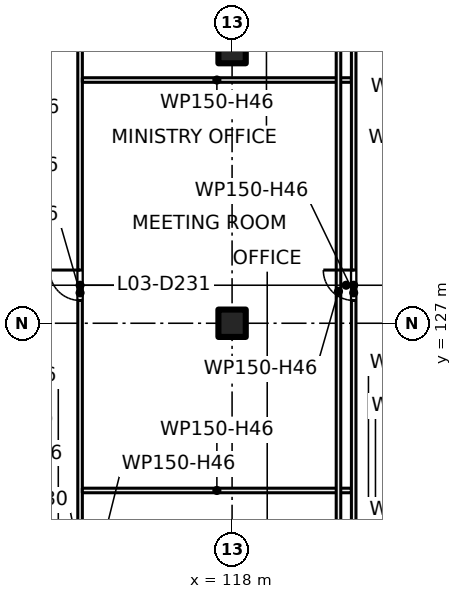
"""IFC4 building model, lengths in metres.
Left out: names, types, materials, properties, quantities, classifications, styles, units other than length and angle.
Written with IfcOpenShell. Run it as: python <this file> out.ifc"""

import sys

from ifc_helpers import new_model, si_unit, direction, frame, frame_2d, origin, origin_2d, place, context, subcontext, project, spatial, rectangle, extrude, element, fill, save


model = new_model("IFC4")
c1 = context("Model", 3, precision=1e-05, world=origin(), true_north=direction((0.0, 1.0)))
c2 = subcontext(c1, "Body", "Model", "MODEL_VIEW")
j1 = project(units=[si_unit("LENGTHUNIT", "METRE"), si_unit("PLANEANGLEUNIT", "RADIAN")], contexts=[c1])
p1 = place(None, origin())
s1 = spatial("IfcSite", under=j1, at=p1, CompositionType="ELEMENT")
p2 = place(p1, origin())
s2 = spatial("IfcBuilding", under=s1, at=p2, CompositionType="ELEMENT")
p3 = place(p2, frame((0.0, 0.0, 17.5)))
s3 = spatial("IfcBuildingStorey", under=s2, at=p3, CompositionType="ELEMENT", Elevation=17.5)
for number, where, z_axis, x_axis in (
    (1, (118.0, 127.0, 0.0), (0.0, 0.0, 1.0), (1.0, 0.0, 0.0)),
    (2, (118.0, 136.0, 0.0), (0.0, 0.0, 1.0), (1.0, 0.0, 0.0)),
):
    element("IfcColumn", number, at=place(p3, frame(where, z_axis=z_axis, x_axis=x_axis)), inside=s3, PredefinedType="COLUMN", context=c2, shape_type="SweptSolid", body=[
        extrude(rectangle(XDim=0.9, YDim=0.9, at=origin_2d()), origin(), (0.0, 0.0, 1.0), 5.0),
    ])
p4 = place(p3, frame((113.0, 139.002, 0.0), z_axis=(0.0, 0.0, 1.0), x_axis=(0.0, -1.0, 0.0)))
e3 = element("IfcWall", 3, at=p4, inside=s3, PredefinedType="PARTITIONING", context=c2, shape_type="SweptSolid", body=[
    extrude(rectangle(XDim=22.004, YDim=0.15, at=frame_2d((11.002, 0.0))), origin(), (0.0, 0.0, 1.0), 4.6),
])
p5 = place(p4, frame((19.25, 0.0, 0.0)))
e4 = element("IfcOpeningElement", 4, at=p5, cuts=e3, PredefinedType="OPENING", context=c2, shape_type="SweptSolid", body=[
    extrude(rectangle(XDim=1.0, YDim=2.1, at=frame_2d((0.5, 1.05))), frame((0.0, 0.085, 0.0), z_axis=(0.0, -1.0, 0.0), x_axis=(1.0, 0.0, 0.0)), (0.0, 0.0, 1.0), 0.17),
])
p6 = place(p4, frame((10.252, 0.0, 0.0)))
e5 = element("IfcOpeningElement", 5, at=p6, cuts=e3, PredefinedType="OPENING", context=c2, shape_type="SweptSolid", body=[
    extrude(rectangle(XDim=1.0, YDim=2.1, at=frame_2d((0.5, 1.05))), frame((0.0, 0.085, 0.0), z_axis=(0.0, -1.0, 0.0), x_axis=(1.0, 0.0, 0.0)), (0.0, 0.0, 1.0), 0.17),
])
p7 = place(p4, frame((1.504, 0.0, 0.0)))
e6 = element("IfcOpeningElement", 6, at=p7, cuts=e3, PredefinedType="OPENING", context=c2, shape_type="SweptSolid", body=[
    extrude(rectangle(XDim=1.0, YDim=2.1, at=frame_2d((0.5, 1.05))), frame((0.0, 0.085, 0.0), z_axis=(0.0, -1.0, 0.0), x_axis=(1.0, 0.0, 0.0)), (0.0, 0.0, 1.0), 0.17),
])
for number, where, z_axis, x_axis in (
    (7, (113.075, 121.5, 0.0), (0.0, 0.0, 1.0), (1.0, 0.0, 0.0)),
    (8, (113.075, 135.0, 0.0), (0.0, 0.0, 1.0), (1.0, 0.0, 0.0)),
):
    element("IfcWall", number, at=place(p3, frame(where, z_axis=z_axis, x_axis=x_axis)), inside=s3, PredefinedType="PARTITIONING", context=c2, shape_type="SweptSolid", body=[
        extrude(rectangle(XDim=8.85, YDim=0.15, at=frame_2d((4.425, 0.0))), origin(), (0.0, 0.0, 1.0), 4.6),
    ])
p8 = place(p3, frame((121.5, 107.925, 0.0), z_axis=(0.0, 0.0, 1.0), x_axis=(0.0, 1.0, 0.0)))
e9 = element("IfcWall", 9, at=p8, inside=s3, PredefinedType="PARTITIONING", context=c2, shape_type="SweptSolid", body=[
    extrude(rectangle(XDim=40.247, YDim=0.15, at=frame_2d((20.124, 0.0))), origin(), (0.0, 0.0, 1.0), 4.6),
])
p9 = place(p3, frame((122.0, 139.002, 0.0), z_axis=(0.0, 0.0, 1.0), x_axis=(0.0, -1.0, 0.0)))
e10 = element("IfcWall", 10, at=p9, inside=s3, PredefinedType="PARTITIONING", context=c2, shape_type="SweptSolid", body=[
    extrude(rectangle(XDim=22.004, YDim=0.15, at=frame_2d((11.002, 0.0))), origin(), (0.0, 0.0, 1.0), 4.6),
])
p10 = place(p9, frame((10.252, 0.0, 0.0)))
e11 = element("IfcOpeningElement", 11, at=p10, cuts=e10, PredefinedType="OPENING", context=c2, shape_type="SweptSolid", body=[
    extrude(rectangle(XDim=1.0, YDim=2.1, at=frame_2d((0.5, 1.05))), frame((0.0, 0.085, 0.0), z_axis=(0.0, -1.0, 0.0), x_axis=(1.0, 0.0, 0.0)), (0.0, 0.0, 1.0), 0.17),
])
p11 = place(p6, origin())
e12 = element("IfcDoor", 12, at=p11, inside=s3, OperationType="SINGLE_SWING_LEFT", PredefinedType="DOOR", context=c2, shape_type="SweptSolid", body=[
    extrude(rectangle(XDim=1.0, YDim=2.1, at=frame_2d((0.5, 1.05))), frame((0.0, 0.025, 0.0), z_axis=(0.0, -1.0, 0.0), x_axis=(1.0, 0.0, 0.0)), (0.0, 0.0, 1.0), 0.05),
])
fill(e5, e12)
p12 = place(p10, origin())
e13 = element("IfcDoor", 13, at=p12, inside=s3, OperationType="SINGLE_SWING_LEFT", PredefinedType="DOOR", context=c2, shape_type="SweptSolid", body=[
    extrude(rectangle(XDim=1.0, YDim=2.1, at=frame_2d((0.5, 1.05))), frame((0.0, 0.025, 0.0), z_axis=(0.0, -1.0, 0.0), x_axis=(1.0, 0.0, 0.0)), (0.0, 0.0, 1.0), 0.05),
])
fill(e11, e13)
save(model, sys.argv[1])
